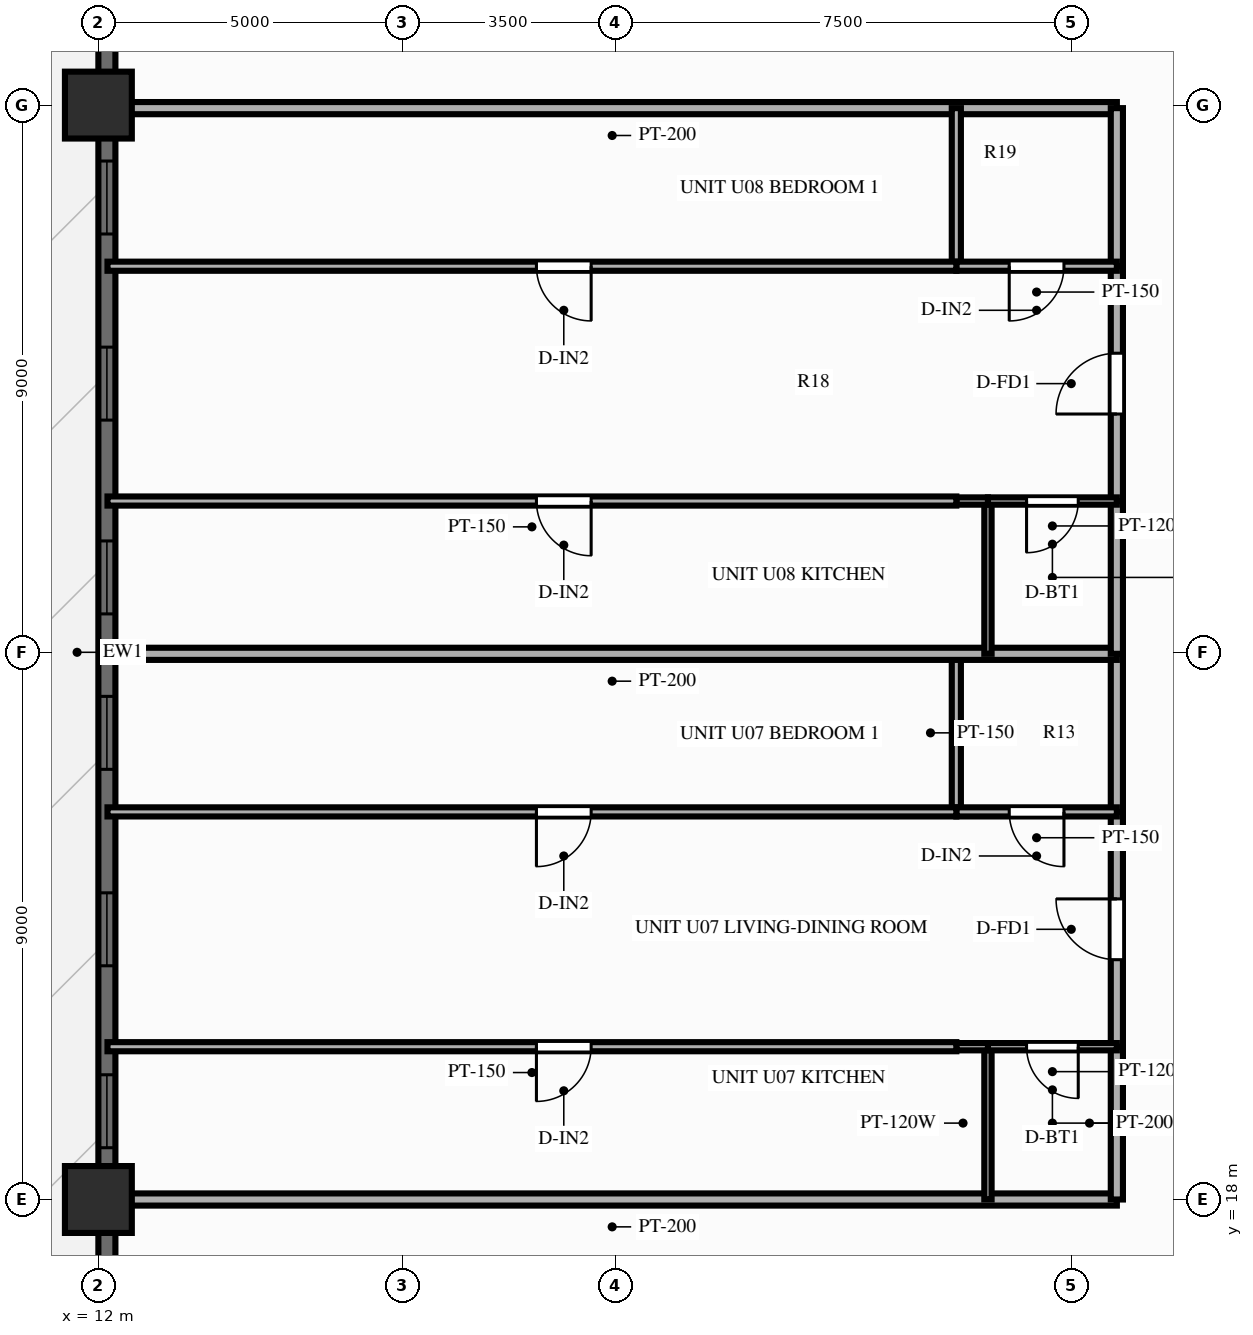
"""IFC4 building model, lengths in metres.
Left out: names, types, materials, properties, quantities, classifications, styles, units other than length and angle.
Written with IfcOpenShell. Run it as: python <this file> out.ifc"""

import sys

from ifc_helpers import new_model, si_unit, direction, frame, frame_2d, origin, origin_2d, place, context, subcontext, project, spatial, rectangle, extrude, source, transform, mapped, element, fill, save


model = new_model("IFC4")
c1 = context("Model", 3, precision=1e-05, world=origin(), true_north=direction((0.0, 1.0)))
c2 = subcontext(c1, "Body", "Model", "MODEL_VIEW")
j1 = project(units=[si_unit("LENGTHUNIT", "METRE"), si_unit("PLANEANGLEUNIT", "RADIAN")], contexts=[c1])
p1 = place(None, origin())
s1 = spatial("IfcSite", under=j1, at=p1, CompositionType="ELEMENT")
p2 = place(p1, origin())
s2 = spatial("IfcBuilding", under=s1, at=p2, CompositionType="ELEMENT")
p3 = place(p2, frame((0.0, 0.0, 46.4)))
s3 = spatial("IfcBuildingStorey", under=s2, at=p3, CompositionType="ELEMENT", Elevation=46.4)
m1 = source(origin(), c2, "Body", "SweptSolid", [
    extrude(rectangle(XDim=1.1, YDim=1.1, at=origin_2d()), origin(), (0.0, 0.0, 1.0), 3.0),
])
for number, where, z_axis, x_axis in (
    (1, (12.0, 36.0, 0.0), (0.0, 0.0, 1.0), (1.0, 0.0, 0.0)),
    (2, (12.0, 18.0, 0.0), (0.0, 0.0, 1.0), (1.0, 0.0, 0.0)),
):
    element("IfcColumn", number, at=place(p3, frame(where, z_axis=z_axis, x_axis=x_axis)), inside=s3, PredefinedType="COLUMN", context=c2, shape_type="MappedRepresentation", body=[
        mapped(m1, transform((0.0, 0.0, 0.0), scale=1.0)),
    ])
p4 = place(p3, frame((12.14, 6.5, 0.0), z_axis=(0.0, 0.0, 1.0), x_axis=(0.0, 1.0, 0.0)))
e3 = element("IfcWall", 3, at=p4, inside=s3, PredefinedType="SOLIDWALL", context=c2, shape_type="SweptSolid", body=[
    extrude(rectangle(XDim=41.0, YDim=0.28, at=frame_2d((20.5, 0.0))), origin(), (0.0, 0.0, 1.0), 2.28),
])
p5 = place(p4, frame((5.15, 0.0, 0.25)))
e4 = element("IfcOpeningElement", 4, at=p5, cuts=e3, PredefinedType="OPENING", context=c2, shape_type="SweptSolid", body=[
    extrude(rectangle(XDim=1.2, YDim=1.5, at=frame_2d((0.6, 0.75))), frame((0.0, 0.152, 0.0), z_axis=(0.0, -1.0, 0.0), x_axis=(1.0, 0.0, 0.0)), (0.0, 0.0, 1.0), 0.304),
])
p6 = place(p4, frame((12.352, 0.0, 0.25)))
e5 = element("IfcOpeningElement", 5, at=p6, cuts=e3, PredefinedType="OPENING", context=c2, shape_type="SweptSolid", body=[
    extrude(rectangle(XDim=1.2, YDim=1.5, at=frame_2d((0.6, 0.75))), frame((0.0, 0.152, 0.0), z_axis=(0.0, -1.0, 0.0), x_axis=(1.0, 0.0, 0.0)), (0.0, 0.0, 1.0), 0.304),
])
p7 = place(p4, frame((15.344, 0.0, 0.25)))
e6 = element("IfcOpeningElement", 6, at=p7, cuts=e3, PredefinedType="OPENING", context=c2, shape_type="SweptSolid", body=[
    extrude(rectangle(XDim=1.2, YDim=1.5, at=frame_2d((0.6, 0.75))), frame((0.0, 0.152, 0.0), z_axis=(0.0, -1.0, 0.0), x_axis=(1.0, 0.0, 0.0)), (0.0, 0.0, 1.0), 0.304),
])
p8 = place(p4, frame((18.575, 0.0, 0.25)))
e7 = element("IfcOpeningElement", 7, at=p8, cuts=e3, PredefinedType="OPENING", context=c2, shape_type="SweptSolid", body=[
    extrude(rectangle(XDim=1.2, YDim=1.5, at=frame_2d((0.6, 0.75))), frame((0.0, 0.152, 0.0), z_axis=(0.0, -1.0, 0.0), x_axis=(1.0, 0.0, 0.0)), (0.0, 0.0, 1.0), 0.304),
])
p9 = place(p4, frame((21.132, 0.0, 0.25)))
e8 = element("IfcOpeningElement", 8, at=p9, cuts=e3, PredefinedType="OPENING", context=c2, shape_type="SweptSolid", body=[
    extrude(rectangle(XDim=1.2, YDim=1.5, at=frame_2d((0.6, 0.75))), frame((0.0, 0.152, 0.0), z_axis=(0.0, -1.0, 0.0), x_axis=(1.0, 0.0, 0.0)), (0.0, 0.0, 1.0), 0.304),
])
p10 = place(p4, frame((24.319, 0.0, 0.25)))
e9 = element("IfcOpeningElement", 9, at=p10, cuts=e3, PredefinedType="OPENING", context=c2, shape_type="SweptSolid", body=[
    extrude(rectangle(XDim=1.2, YDim=1.5, at=frame_2d((0.6, 0.75))), frame((0.0, 0.152, 0.0), z_axis=(0.0, -1.0, 0.0), x_axis=(1.0, 0.0, 0.0)), (0.0, 0.0, 1.0), 0.304),
])
p11 = place(p4, frame((27.38, 0.0, 0.25)))
e10 = element("IfcOpeningElement", 10, at=p11, cuts=e3, PredefinedType="OPENING", context=c2, shape_type="SweptSolid", body=[
    extrude(rectangle(XDim=1.2, YDim=1.5, at=frame_2d((0.6, 0.75))), frame((0.0, 0.152, 0.0), z_axis=(0.0, -1.0, 0.0), x_axis=(1.0, 0.0, 0.0)), (0.0, 0.0, 1.0), 0.304),
])
p12 = place(p4, frame((34.45, 0.0, 0.0)))
e11 = element("IfcOpeningElement", 11, at=p12, cuts=e3, PredefinedType="OPENING", context=c2, shape_type="SweptSolid", body=[
    extrude(rectangle(XDim=1.6, YDim=2.15, at=frame_2d((0.8, 1.075))), frame((0.0, 0.152, 0.0), z_axis=(0.0, -1.0, 0.0), x_axis=(1.0, 0.0, 0.0)), (0.0, 0.0, 1.0), 0.304),
])
for number, where, z_axis, x_axis in (
    (12, (28.75, 18.0, 0.0), (0.0, 0.0, 1.0), (-1.0, 0.0, 0.0)),
    (13, (28.75, 35.95, 0.0), (0.0, 0.0, 1.0), (-1.0, 0.0, 0.0)),
):
    element("IfcWall", number, at=place(p3, frame(where, z_axis=z_axis, x_axis=x_axis)), inside=s3, PredefinedType="PARTITIONING", context=c2, shape_type="SweptSolid", body=[
        extrude(rectangle(XDim=16.6, YDim=0.2, at=frame_2d((8.3, 0.0))), origin(), (0.0, 0.0, 1.0), 2.24),
    ])
p13 = place(p3, frame((28.75, 18.0, 0.0), z_axis=(0.0, 0.0, 1.0), x_axis=(0.0, 1.0, 0.0)))
e14 = element("IfcWall", 14, at=p13, inside=s3, PredefinedType="PARTITIONING", context=c2, shape_type="SweptSolid", body=[
    extrude(rectangle(XDim=2.513, YDim=0.2, at=frame_2d((1.256, 0.0))), origin(), (0.0, 0.0, 1.0), 2.79),
])
p14 = place(p3, frame((28.75, 20.513, 0.0), z_axis=(0.0, 0.0, 1.0), x_axis=(0.0, 1.0, 0.0)))
e15 = element("IfcWall", 15, at=p14, inside=s3, PredefinedType="PARTITIONING", context=c2, shape_type="SweptSolid", body=[
    extrude(rectangle(XDim=3.862, YDim=0.2, at=frame_2d((1.931, 0.0))), origin(), (0.0, 0.0, 1.0), 2.79),
])
p15 = place(p14, frame((1.431, 0.0, 0.0)))
e16 = element("IfcOpeningElement", 16, at=p15, cuts=e15, PredefinedType="OPENING", context=c2, shape_type="SweptSolid", body=[
    extrude(rectangle(XDim=1.0, YDim=2.15, at=frame_2d((0.5, 1.075))), frame((0.0, 0.112, 0.0), z_axis=(0.0, -1.0, 0.0), x_axis=(1.0, 0.0, 0.0)), (0.0, 0.0, 1.0), 0.224),
])
p16 = place(p3, frame((28.75, 24.375, 0.0), z_axis=(0.0, 0.0, 1.0), x_axis=(0.0, 1.0, 0.0)))
e17 = element("IfcWall", 17, at=p16, inside=s3, PredefinedType="PARTITIONING", context=c2, shape_type="SweptSolid", body=[
    extrude(rectangle(XDim=2.6, YDim=0.2, at=frame_2d((1.3, 0.0))), origin(), (0.0, 0.0, 1.0), 2.79),
])
p17 = place(p3, frame((26.63, 18.0, 0.0), z_axis=(0.0, 0.0, 1.0), x_axis=(0.0, 1.0, 0.0)))
e18 = element("IfcWall", 18, at=p17, inside=s3, PredefinedType="PARTITIONING", context=c2, shape_type="SweptSolid", body=[
    extrude(rectangle(XDim=2.513, YDim=0.12, at=frame_2d((1.256, 0.0))), origin(), (0.0, 0.0, 1.0), 2.79),
])
p18 = place(p3, frame((26.11, 24.375, 0.0), z_axis=(0.0, 0.0, 1.0), x_axis=(0.0, 1.0, 0.0)))
e19 = element("IfcWall", 19, at=p18, inside=s3, PredefinedType="PARTITIONING", context=c2, shape_type="SweptSolid", body=[
    extrude(rectangle(XDim=2.6, YDim=0.15, at=frame_2d((1.3, 0.0))), origin(), (0.0, 0.0, 1.0), 2.79),
])
p19 = place(p3, frame((28.75, 20.513, 0.0), z_axis=(0.0, 0.0, 1.0), x_axis=(-1.0, 0.0, 0.0)))
e20 = element("IfcWall", 20, at=p19, inside=s3, PredefinedType="PARTITIONING", context=c2, shape_type="SweptSolid", body=[
    extrude(rectangle(XDim=2.12, YDim=0.12, at=frame_2d((1.06, 0.0))), origin(), (0.0, 0.0, 1.0), 2.79),
])
p20 = place(p19, frame((0.635, 0.0, 0.0)))
e21 = element("IfcOpeningElement", 21, at=p20, cuts=e20, PredefinedType="OPENING", context=c2, shape_type="SweptSolid", body=[
    extrude(rectangle(XDim=0.85, YDim=2.05, at=frame_2d((0.425, 1.025))), frame((0.0, 0.072, 0.0), z_axis=(0.0, -1.0, 0.0), x_axis=(1.0, 0.0, 0.0)), (0.0, 0.0, 1.0), 0.144),
])
p21 = place(p3, frame((26.63, 20.513, 0.0), z_axis=(0.0, 0.0, 1.0), x_axis=(-1.0, 0.0, 0.0)))
e22 = element("IfcWall", 22, at=p21, inside=s3, PredefinedType="PARTITIONING", context=c2, shape_type="SweptSolid", body=[
    extrude(rectangle(XDim=0.52, YDim=0.12, at=frame_2d((0.26, 0.0))), origin(), (0.0, 0.0, 1.0), 2.79),
])
p22 = place(p3, frame((26.11, 20.513, 0.0), z_axis=(0.0, 0.0, 1.0), x_axis=(-1.0, 0.0, 0.0)))
e23 = element("IfcWall", 23, at=p22, inside=s3, PredefinedType="PARTITIONING", context=c2, shape_type="SweptSolid", body=[
    extrude(rectangle(XDim=13.96, YDim=0.15, at=frame_2d((6.98, 0.0))), origin(), (0.0, 0.0, 1.0), 2.79),
])
p23 = place(p22, frame((6.006, 0.0, 0.0)))
e24 = element("IfcOpeningElement", 24, at=p23, cuts=e23, PredefinedType="OPENING", context=c2, shape_type="SweptSolid", body=[
    extrude(rectangle(XDim=0.9, YDim=2.1, at=frame_2d((0.45, 1.05))), frame((0.0, 0.087, 0.0), z_axis=(0.0, -1.0, 0.0), x_axis=(1.0, 0.0, 0.0)), (0.0, 0.0, 1.0), 0.174),
])
p24 = place(p3, frame((28.75, 24.375, 0.0), z_axis=(0.0, 0.0, 1.0), x_axis=(-1.0, 0.0, 0.0)))
e25 = element("IfcWall", 25, at=p24, inside=s3, PredefinedType="PARTITIONING", context=c2, shape_type="SweptSolid", body=[
    extrude(rectangle(XDim=2.64, YDim=0.15, at=frame_2d((1.32, 0.0))), origin(), (0.0, 0.0, 1.0), 2.79),
])
p25 = place(p24, frame((0.87, 0.0, 0.0)))
e26 = element("IfcOpeningElement", 26, at=p25, cuts=e25, PredefinedType="OPENING", context=c2, shape_type="SweptSolid", body=[
    extrude(rectangle(XDim=0.9, YDim=2.1, at=frame_2d((0.45, 1.05))), frame((0.0, 0.087, 0.0), z_axis=(0.0, -1.0, 0.0), x_axis=(1.0, 0.0, 0.0)), (0.0, 0.0, 1.0), 0.174),
])
p26 = place(p3, frame((26.11, 24.375, 0.0), z_axis=(0.0, 0.0, 1.0), x_axis=(-1.0, 0.0, 0.0)))
e27 = element("IfcWall", 27, at=p26, inside=s3, PredefinedType="PARTITIONING", context=c2, shape_type="SweptSolid", body=[
    extrude(rectangle(XDim=13.96, YDim=0.15, at=frame_2d((6.98, 0.0))), origin(), (0.0, 0.0, 1.0), 2.79),
])
p27 = place(p26, frame((6.006, 0.0, 0.0)))
e28 = element("IfcOpeningElement", 28, at=p27, cuts=e27, PredefinedType="OPENING", context=c2, shape_type="SweptSolid", body=[
    extrude(rectangle(XDim=0.9, YDim=2.1, at=frame_2d((0.45, 1.05))), frame((0.0, 0.087, 0.0), z_axis=(0.0, -1.0, 0.0), x_axis=(1.0, 0.0, 0.0)), (0.0, 0.0, 1.0), 0.174),
])
p28 = place(p3, frame((28.75, 26.975, 0.0), z_axis=(0.0, 0.0, 1.0), x_axis=(-1.0, 0.0, 0.0)))
e29 = element("IfcWall", 29, at=p28, inside=s3, PredefinedType="PARTITIONING", context=c2, shape_type="SweptSolid", body=[
    extrude(rectangle(XDim=16.6, YDim=0.2, at=frame_2d((8.3, 0.0))), origin(), (0.0, 0.0, 1.0), 2.79),
])
p29 = place(p3, frame((28.75, 26.975, 0.0), z_axis=(0.0, 0.0, 1.0), x_axis=(0.0, 1.0, 0.0)))
e30 = element("IfcWall", 30, at=p29, inside=s3, PredefinedType="PARTITIONING", context=c2, shape_type="SweptSolid", body=[
    extrude(rectangle(XDim=2.513, YDim=0.2, at=frame_2d((1.256, 0.0))), origin(), (0.0, 0.0, 1.0), 2.79),
])
p30 = place(p3, frame((28.75, 29.488, 0.0), z_axis=(0.0, 0.0, 1.0), x_axis=(0.0, 1.0, 0.0)))
e31 = element("IfcWall", 31, at=p30, inside=s3, PredefinedType="PARTITIONING", context=c2, shape_type="SweptSolid", body=[
    extrude(rectangle(XDim=3.862, YDim=0.2, at=frame_2d((1.931, 0.0))), origin(), (0.0, 0.0, 1.0), 2.79),
])
p31 = place(p30, frame((1.431, 0.0, 0.0)))
e32 = element("IfcOpeningElement", 32, at=p31, cuts=e31, PredefinedType="OPENING", context=c2, shape_type="SweptSolid", body=[
    extrude(rectangle(XDim=1.0, YDim=2.15, at=frame_2d((0.5, 1.075))), frame((0.0, 0.112, 0.0), z_axis=(0.0, -1.0, 0.0), x_axis=(1.0, 0.0, 0.0)), (0.0, 0.0, 1.0), 0.224),
])
p32 = place(p3, frame((28.75, 33.35, 0.0), z_axis=(0.0, 0.0, 1.0), x_axis=(0.0, 1.0, 0.0)))
e33 = element("IfcWall", 33, at=p32, inside=s3, PredefinedType="PARTITIONING", context=c2, shape_type="SweptSolid", body=[
    extrude(rectangle(XDim=2.6, YDim=0.2, at=frame_2d((1.3, 0.0))), origin(), (0.0, 0.0, 1.0), 2.79),
])
p33 = place(p3, frame((26.63, 26.975, 0.0), z_axis=(0.0, 0.0, 1.0), x_axis=(0.0, 1.0, 0.0)))
e34 = element("IfcWall", 34, at=p33, inside=s3, PredefinedType="PARTITIONING", context=c2, shape_type="SweptSolid", body=[
    extrude(rectangle(XDim=2.513, YDim=0.12, at=frame_2d((1.256, 0.0))), origin(), (0.0, 0.0, 1.0), 2.79),
])
p34 = place(p3, frame((26.11, 33.35, 0.0), z_axis=(0.0, 0.0, 1.0), x_axis=(0.0, 1.0, 0.0)))
e35 = element("IfcWall", 35, at=p34, inside=s3, PredefinedType="PARTITIONING", context=c2, shape_type="SweptSolid", body=[
    extrude(rectangle(XDim=2.6, YDim=0.15, at=frame_2d((1.3, 0.0))), origin(), (0.0, 0.0, 1.0), 2.79),
])
p35 = place(p3, frame((28.75, 29.488, 0.0), z_axis=(0.0, 0.0, 1.0), x_axis=(-1.0, 0.0, 0.0)))
e36 = element("IfcWall", 36, at=p35, inside=s3, PredefinedType="PARTITIONING", context=c2, shape_type="SweptSolid", body=[
    extrude(rectangle(XDim=2.12, YDim=0.12, at=frame_2d((1.06, 0.0))), origin(), (0.0, 0.0, 1.0), 2.79),
])
p36 = place(p35, frame((0.635, 0.0, 0.0)))
e37 = element("IfcOpeningElement", 37, at=p36, cuts=e36, PredefinedType="OPENING", context=c2, shape_type="SweptSolid", body=[
    extrude(rectangle(XDim=0.85, YDim=2.05, at=frame_2d((0.425, 1.025))), frame((0.0, 0.072, 0.0), z_axis=(0.0, -1.0, 0.0), x_axis=(1.0, 0.0, 0.0)), (0.0, 0.0, 1.0), 0.144),
])
p37 = place(p3, frame((26.63, 29.488, 0.0), z_axis=(0.0, 0.0, 1.0), x_axis=(-1.0, 0.0, 0.0)))
e38 = element("IfcWall", 38, at=p37, inside=s3, PredefinedType="PARTITIONING", context=c2, shape_type="SweptSolid", body=[
    extrude(rectangle(XDim=0.52, YDim=0.12, at=frame_2d((0.26, 0.0))), origin(), (0.0, 0.0, 1.0), 2.79),
])
p38 = place(p3, frame((26.11, 29.488, 0.0), z_axis=(0.0, 0.0, 1.0), x_axis=(-1.0, 0.0, 0.0)))
e39 = element("IfcWall", 39, at=p38, inside=s3, PredefinedType="PARTITIONING", context=c2, shape_type="SweptSolid", body=[
    extrude(rectangle(XDim=13.96, YDim=0.15, at=frame_2d((6.98, 0.0))), origin(), (0.0, 0.0, 1.0), 2.79),
])
p39 = place(p38, frame((6.006, 0.0, 0.0)))
e40 = element("IfcOpeningElement", 40, at=p39, cuts=e39, PredefinedType="OPENING", context=c2, shape_type="SweptSolid", body=[
    extrude(rectangle(XDim=0.9, YDim=2.1, at=frame_2d((0.45, 1.05))), frame((0.0, 0.087, 0.0), z_axis=(0.0, -1.0, 0.0), x_axis=(1.0, 0.0, 0.0)), (0.0, 0.0, 1.0), 0.174),
])
p40 = place(p3, frame((28.75, 33.35, 0.0), z_axis=(0.0, 0.0, 1.0), x_axis=(-1.0, 0.0, 0.0)))
e41 = element("IfcWall", 41, at=p40, inside=s3, PredefinedType="PARTITIONING", context=c2, shape_type="SweptSolid", body=[
    extrude(rectangle(XDim=2.64, YDim=0.15, at=frame_2d((1.32, 0.0))), origin(), (0.0, 0.0, 1.0), 2.79),
])
p41 = place(p40, frame((0.87, 0.0, 0.0)))
e42 = element("IfcOpeningElement", 42, at=p41, cuts=e41, PredefinedType="OPENING", context=c2, shape_type="SweptSolid", body=[
    extrude(rectangle(XDim=0.9, YDim=2.1, at=frame_2d((0.45, 1.05))), frame((0.0, 0.087, 0.0), z_axis=(0.0, -1.0, 0.0), x_axis=(1.0, 0.0, 0.0)), (0.0, 0.0, 1.0), 0.174),
])
p42 = place(p3, frame((26.11, 33.35, 0.0), z_axis=(0.0, 0.0, 1.0), x_axis=(-1.0, 0.0, 0.0)))
e43 = element("IfcWall", 43, at=p42, inside=s3, PredefinedType="PARTITIONING", context=c2, shape_type="SweptSolid", body=[
    extrude(rectangle(XDim=13.96, YDim=0.15, at=frame_2d((6.98, 0.0))), origin(), (0.0, 0.0, 1.0), 2.79),
])
p43 = place(p42, frame((6.006, 0.0, 0.0)))
e44 = element("IfcOpeningElement", 44, at=p43, cuts=e43, PredefinedType="OPENING", context=c2, shape_type="SweptSolid", body=[
    extrude(rectangle(XDim=0.9, YDim=2.1, at=frame_2d((0.45, 1.05))), frame((0.0, 0.087, 0.0), z_axis=(0.0, -1.0, 0.0), x_axis=(1.0, 0.0, 0.0)), (0.0, 0.0, 1.0), 0.174),
])
m2 = source(origin(), c2, "Body", "SweptSolid", [
    extrude(rectangle(XDim=1.2, YDim=1.5, at=frame_2d((0.6, 0.75))), frame((0.0, 0.03, 0.0), z_axis=(0.0, -1.0, 0.0), x_axis=(1.0, 0.0, 0.0)), (0.0, 0.0, 1.0), 0.06),
])
p44 = place(p6, origin())
e45 = element("IfcWindow", 45, at=p44, inside=s3, PartitioningType="SINGLE_PANEL", PredefinedType="WINDOW", context=c2, shape_type="MappedRepresentation", body=[
    mapped(m2, transform((0.0, 0.0, 0.0), scale=1.0)),
])
fill(e5, e45)
p45 = place(p7, origin())
e46 = element("IfcWindow", 46, at=p45, inside=s3, PartitioningType="SINGLE_PANEL", PredefinedType="WINDOW", context=c2, shape_type="MappedRepresentation", body=[
    mapped(m2, transform((0.0, 0.0, 0.0), scale=1.0)),
])
fill(e6, e46)
p46 = place(p8, origin())
e47 = element("IfcWindow", 47, at=p46, inside=s3, PartitioningType="SINGLE_PANEL", PredefinedType="WINDOW", context=c2, shape_type="MappedRepresentation", body=[
    mapped(m2, transform((0.0, 0.0, 0.0), scale=1.0)),
])
fill(e7, e47)
p47 = place(p9, origin())
e48 = element("IfcWindow", 48, at=p47, inside=s3, PartitioningType="SINGLE_PANEL", PredefinedType="WINDOW", context=c2, shape_type="MappedRepresentation", body=[
    mapped(m2, transform((0.0, 0.0, 0.0), scale=1.0)),
])
fill(e8, e48)
p48 = place(p10, origin())
e49 = element("IfcWindow", 49, at=p48, inside=s3, PartitioningType="SINGLE_PANEL", PredefinedType="WINDOW", context=c2, shape_type="MappedRepresentation", body=[
    mapped(m2, transform((0.0, 0.0, 0.0), scale=1.0)),
])
fill(e9, e49)
p49 = place(p11, origin())
e50 = element("IfcWindow", 50, at=p49, inside=s3, PartitioningType="SINGLE_PANEL", PredefinedType="WINDOW", context=c2, shape_type="MappedRepresentation", body=[
    mapped(m2, transform((0.0, 0.0, 0.0), scale=1.0)),
])
fill(e10, e50)
m3 = source(origin(), c2, "Body", "SweptSolid", [
    extrude(rectangle(XDim=1.0, YDim=2.15, at=frame_2d((0.5, 1.075))), frame((0.0, 0.025, 0.0), z_axis=(0.0, -1.0, 0.0), x_axis=(1.0, 0.0, 0.0)), (0.0, 0.0, 1.0), 0.05),
])
p50 = place(p15, origin())
e51 = element("IfcDoor", 51, at=p50, inside=s3, OperationType="SINGLE_SWING_RIGHT", PredefinedType="DOOR", context=c2, shape_type="MappedRepresentation", body=[
    mapped(m3, transform((0.0, 0.0, 0.0), scale=1.0)),
])
fill(e16, e51)
m4 = source(origin(), c2, "Body", "SweptSolid", [
    extrude(rectangle(XDim=0.85, YDim=2.05, at=frame_2d((0.425, 1.025))), frame((0.0, 0.025, 0.0), z_axis=(0.0, -1.0, 0.0), x_axis=(1.0, 0.0, 0.0)), (0.0, 0.0, 1.0), 0.05),
])
p51 = place(p20, origin())
e52 = element("IfcDoor", 52, at=p51, inside=s3, OperationType="SINGLE_SWING_LEFT", PredefinedType="DOOR", context=c2, shape_type="MappedRepresentation", body=[
    mapped(m4, transform((0.0, 0.0, 0.0), scale=1.0)),
])
fill(e21, e52)
m5 = source(origin(), c2, "Body", "SweptSolid", [
    extrude(rectangle(XDim=0.9, YDim=2.1, at=frame_2d((0.45, 1.05))), frame((0.0, 0.025, 0.0), z_axis=(0.0, -1.0, 0.0), x_axis=(1.0, 0.0, 0.0)), (0.0, 0.0, 1.0), 0.05),
])
p52 = place(p23, origin())
e53 = element("IfcDoor", 53, at=p52, inside=s3, OperationType="SINGLE_SWING_RIGHT", PredefinedType="DOOR", context=c2, shape_type="MappedRepresentation", body=[
    mapped(m5, transform((0.0, 0.0, 0.0), scale=1.0)),
])
fill(e24, e53)
p53 = place(p25, origin())
e54 = element("IfcDoor", 54, at=p53, inside=s3, OperationType="SINGLE_SWING_LEFT", PredefinedType="DOOR", context=c2, shape_type="MappedRepresentation", body=[
    mapped(m5, transform((0.0, 0.0, 0.0), scale=1.0)),
])
fill(e26, e54)
p54 = place(p27, origin())
e55 = element("IfcDoor", 55, at=p54, inside=s3, OperationType="SINGLE_SWING_RIGHT", PredefinedType="DOOR", context=c2, shape_type="MappedRepresentation", body=[
    mapped(m5, transform((0.0, 0.0, 0.0), scale=1.0)),
])
fill(e28, e55)
p55 = place(p31, origin())
e56 = element("IfcDoor", 56, at=p55, inside=s3, OperationType="SINGLE_SWING_LEFT", PredefinedType="DOOR", context=c2, shape_type="MappedRepresentation", body=[
    mapped(m3, transform((0.0, 0.0, 0.0), scale=1.0)),
])
fill(e32, e56)
p56 = place(p36, origin())
e57 = element("IfcDoor", 57, at=p56, inside=s3, OperationType="SINGLE_SWING_RIGHT", PredefinedType="DOOR", context=c2, shape_type="MappedRepresentation", body=[
    mapped(m4, transform((0.0, 0.0, 0.0), scale=1.0)),
])
fill(e37, e57)
p57 = place(p39, origin())
e58 = element("IfcDoor", 58, at=p57, inside=s3, OperationType="SINGLE_SWING_LEFT", PredefinedType="DOOR", context=c2, shape_type="MappedRepresentation", body=[
    mapped(m5, transform((0.0, 0.0, 0.0), scale=1.0)),
])
fill(e40, e58)
p58 = place(p41, origin())
e59 = element("IfcDoor", 59, at=p58, inside=s3, OperationType="SINGLE_SWING_RIGHT", PredefinedType="DOOR", context=c2, shape_type="MappedRepresentation", body=[
    mapped(m5, transform((0.0, 0.0, 0.0), scale=1.0)),
])
fill(e42, e59)
p59 = place(p43, origin())
e60 = element("IfcDoor", 60, at=p59, inside=s3, OperationType="SINGLE_SWING_LEFT", PredefinedType="DOOR", context=c2, shape_type="MappedRepresentation", body=[
    mapped(m5, transform((0.0, 0.0, 0.0), scale=1.0)),
])
fill(e44, e60)
save(model, sys.argv[1])
